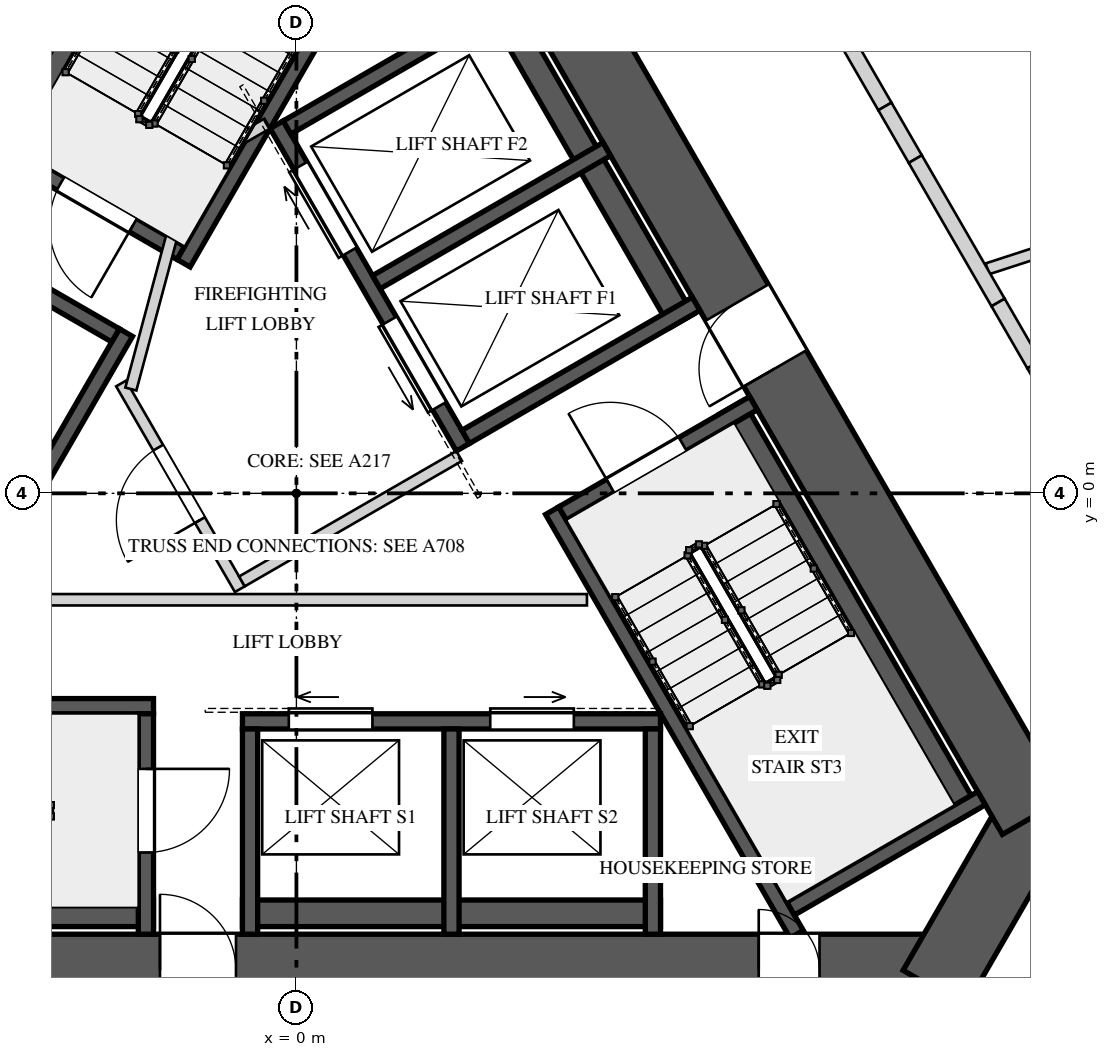
"""IFC4 building model, lengths in metres.
Left out: names, types, materials, properties, quantities, classifications, styles, units other than length and angle.
Written with IfcOpenShell. Run it as: python <this file> out.ifc"""

import sys

from ifc_helpers import new_model, si_unit, direction, frame, frame_2d, origin, place, context, subcontext, project, spatial, rectangle, extrude, element, fill, save


model = new_model("IFC4")
c1 = context("Model", 3, precision=1e-05, world=origin(), true_north=direction((0.0, 1.0)))
c2 = subcontext(c1, "Body", "Model", "MODEL_VIEW")
j1 = project(units=[si_unit("LENGTHUNIT", "METRE"), si_unit("PLANEANGLEUNIT", "RADIAN")], contexts=[c1])
p1 = place(None, origin())
s1 = spatial("IfcSite", under=j1, at=p1, CompositionType="ELEMENT")
p2 = place(p1, origin())
s2 = spatial("IfcBuilding", under=s1, at=p2, CompositionType="ELEMENT")
p3 = place(p2, frame((0.0, 0.0, 120.4)))
s3 = spatial("IfcBuildingStorey", under=s2, at=p3, CompositionType="ELEMENT", Elevation=120.4)
p4 = place(p3, frame((-1.169, 10.525, 0.0), z_axis=(0.0, 0.0, 1.0), x_axis=(-0.499999102847, -0.866025921755, 0.0)))
e1 = element("IfcWall", 1, at=p4, inside=s3, PredefinedType="SHEAR", context=c2, shape_type="SweptSolid", body=[
    extrude(rectangle(XDim=17.061, YDim=0.95, at=frame_2d((8.53, 0.0))), origin(), (0.0, 0.0, 1.0), 5.2),
])
p5 = place(p4, frame((6.735, 0.0, 0.0)))
e2 = element("IfcOpeningElement", 2, at=p5, cuts=e1, PredefinedType="OPENING", context=c2, shape_type="SweptSolid", body=[
    extrude(rectangle(XDim=1.0, YDim=2.4, at=frame_2d((0.5, 1.2))), frame((0.0, 0.485, 0.0), z_axis=(0.0, -1.0, 0.0), x_axis=(1.0, 0.0, 0.0)), (0.0, 0.0, 1.0), 0.97),
])
p6 = place(p3, frame((-8.531, -6.275, 0.0), z_axis=(0.0, 0.0, 1.0), x_axis=(1.0, 0.0, 0.0)))
e3 = element("IfcWall", 3, at=p6, inside=s3, PredefinedType="SHEAR", context=c2, shape_type="SweptSolid", body=[
    extrude(rectangle(XDim=17.061, YDim=0.95, at=frame_2d((8.531, 0.0))), origin(), (0.0, 0.0, 1.0), 5.2),
])
p7 = place(p6, frame((6.735, 0.0, 0.0)))
e4 = element("IfcOpeningElement", 4, at=p7, cuts=e3, PredefinedType="OPENING", context=c2, shape_type="SweptSolid", body=[
    extrude(rectangle(XDim=1.0, YDim=2.4, at=frame_2d((0.5, 1.2))), frame((0.0, 0.485, 0.0), z_axis=(0.0, -1.0, 0.0), x_axis=(1.0, 0.0, 0.0)), (0.0, 0.0, 1.0), 0.97),
])
p8 = place(p6, frame((14.613, 0.0, 0.0)))
e5 = element("IfcOpeningElement", 5, at=p8, cuts=e3, PredefinedType="OPENING", context=c2, shape_type="SweptSolid", body=[
    extrude(rectangle(XDim=0.8, YDim=2.1, at=frame_2d((0.4, 1.05))), frame((0.0, 0.485, 0.0), z_axis=(0.0, -1.0, 0.0), x_axis=(1.0, 0.0, 0.0)), (0.0, 0.0, 1.0), 0.97),
])
p9 = place(p3, frame((8.393, -6.512, 0.0), z_axis=(0.0, 0.0, 1.0), x_axis=(0.499995765644, 0.866027848477, 0.0)))
e6 = element("IfcWall", 6, at=p9, inside=s3, PredefinedType="SHEAR", context=c2, shape_type="SweptSolid", body=[
    extrude(rectangle(XDim=2.887, YDim=0.95, at=frame_2d((1.443, 0.0))), origin(), (0.0, 0.0, 1.0), 5.2),
])
p10 = place(p3, frame((9.699, -4.25, 0.0), z_axis=(0.0, 0.0, 1.0), x_axis=(-0.499999102847, 0.866025921755, 0.0)))
e7 = element("IfcWall", 7, at=p10, inside=s3, PredefinedType="SHEAR", context=c2, shape_type="SweptSolid", body=[
    extrude(rectangle(XDim=17.061, YDim=0.95, at=frame_2d((8.53, 0.0))), origin(), (0.0, 0.0, 1.0), 5.2),
])
p11 = place(p10, frame((6.805, 0.0, 0.0)))
e8 = element("IfcOpeningElement", 8, at=p11, cuts=e7, PredefinedType="OPENING", context=c2, shape_type="SweptSolid", body=[
    extrude(rectangle(XDim=1.0, YDim=2.4, at=frame_2d((0.5, 1.2))), frame((0.0, 0.485, 0.0), z_axis=(0.0, -1.0, 0.0), x_axis=(1.0, 0.0, 0.0)), (0.0, 0.0, 1.0), 0.97),
])
p12 = place(p10, frame((14.114, 0.0, 0.0)))
e9 = element("IfcOpeningElement", 9, at=p12, cuts=e7, PredefinedType="OPENING", context=c2, shape_type="SweptSolid", body=[
    extrude(rectangle(XDim=0.8, YDim=2.1, at=frame_2d((0.4, 1.05))), frame((0.0, 0.485, 0.0), z_axis=(0.0, -1.0, 0.0), x_axis=(1.0, 0.0, 0.0)), (0.0, 0.0, 1.0), 0.97),
])
p13 = place(p3, frame((-0.745, 9.76, 0.0), z_axis=(0.0, 0.0, 1.0), x_axis=(-0.49998037582, -0.866036733513, 0.0)))
e10 = element("IfcWall", 10, at=p13, inside=s3, PredefinedType="SOLIDWALL", context=c2, shape_type="SweptSolid", body=[
    extrude(rectangle(XDim=6.2, YDim=0.35, at=frame_2d((3.1, 0.0))), origin(), (0.0, 0.0, 1.0), 4.85),
])
p14 = place(p3, frame((1.732, 8.6, 0.0), z_axis=(0.0, 0.0, 1.0), x_axis=(-0.499975376872, -0.866039619487, 0.0)))
e11 = element("IfcWall", 11, at=p14, inside=s3, PredefinedType="SOLIDWALL", context=c2, shape_type="SweptSolid", body=[
    extrude(rectangle(XDim=6.434, YDim=0.2, at=frame_2d((3.217, 0.0))), origin(), (0.0, 0.0, 1.0), 4.85),
])
p15 = place(p3, frame((-1.521, 3.165, 0.0), z_axis=(0.0, 0.0, 1.0), x_axis=(-0.866032775405, 0.499987231761, 0.0)))
e12 = element("IfcWall", 12, at=p15, inside=s3, PredefinedType="SOLIDWALL", context=c2, shape_type="SweptSolid", body=[
    extrude(rectangle(XDim=2.9, YDim=0.2, at=frame_2d((1.45, 0.0))), origin(), (0.0, 0.0, 1.0), 4.85),
])
p16 = place(p15, frame((0.725, 0.0, 0.0)))
e13 = element("IfcOpeningElement", 13, at=p16, cuts=e12, PredefinedType="OPENING", context=c2, shape_type="SweptSolid", body=[
    extrude(rectangle(XDim=1.1, YDim=2.4, at=frame_2d((0.55, 1.2))), frame((0.0, 0.11, 0.0), z_axis=(0.0, -1.0, 0.0), x_axis=(1.0, 0.0, 0.0)), (0.0, 0.0, 1.0), 0.22),
])
p17 = place(p3, frame((-8.08, -5.525, 0.0), z_axis=(0.0, 0.0, 1.0), x_axis=(1.0, 0.0, 0.0)))
e14 = element("IfcWall", 14, at=p17, inside=s3, PredefinedType="SOLIDWALL", context=c2, shape_type="SweptSolid", body=[
    extrude(rectangle(XDim=6.2, YDim=0.35, at=frame_2d((3.1, 0.0))), origin(), (0.0, 0.0, 1.0), 4.85),
])
p18 = place(p3, frame((-8.314, -2.8, 0.0), z_axis=(0.0, 0.0, 1.0), x_axis=(1.0, 0.0, 0.0)))
e15 = element("IfcWall", 15, at=p18, inside=s3, PredefinedType="SOLIDWALL", context=c2, shape_type="SweptSolid", body=[
    extrude(rectangle(XDim=6.434, YDim=0.2, at=frame_2d((3.217, 0.0))), origin(), (0.0, 0.0, 1.0), 4.85),
])
p19 = place(p3, frame((-1.98, -2.9, 0.0), z_axis=(0.0, 0.0, 1.0), x_axis=(0.0, -1.0, 0.0)))
e16 = element("IfcWall", 16, at=p19, inside=s3, PredefinedType="SOLIDWALL", context=c2, shape_type="SweptSolid", body=[
    extrude(rectangle(XDim=2.9, YDim=0.2, at=frame_2d((1.45, 0.0))), origin(), (0.0, 0.0, 1.0), 4.85),
])
p20 = place(p19, frame((0.725, 0.0, 0.0)))
e17 = element("IfcOpeningElement", 17, at=p20, cuts=e16, PredefinedType="OPENING", context=c2, shape_type="SweptSolid", body=[
    extrude(rectangle(XDim=1.1, YDim=2.4, at=frame_2d((0.55, 1.2))), frame((0.0, 0.11, 0.0), z_axis=(0.0, -1.0, 0.0), x_axis=(1.0, 0.0, 0.0)), (0.0, 0.0, 1.0), 0.22),
])
p21 = place(p3, frame((8.825, -4.235, 0.0), z_axis=(0.0, 0.0, 1.0), x_axis=(-0.499997426962, 0.866026889324, 0.0)))
e18 = element("IfcWall", 18, at=p21, inside=s3, PredefinedType="SOLIDWALL", context=c2, shape_type="SweptSolid", body=[
    extrude(rectangle(XDim=6.2, YDim=0.35, at=frame_2d((3.1, 0.0))), origin(), (0.0, 0.0, 1.0), 4.85),
])
p22 = place(p3, frame((6.582, -5.8, 0.0), z_axis=(0.0, 0.0, 1.0), x_axis=(-0.499975376872, 0.866039619487, 0.0)))
e19 = element("IfcWall", 19, at=p22, inside=s3, PredefinedType="SOLIDWALL", context=c2, shape_type="SweptSolid", body=[
    extrude(rectangle(XDim=6.434, YDim=0.2, at=frame_2d((3.217, 0.0))), origin(), (0.0, 0.0, 1.0), 4.85),
])
p23 = place(p3, frame((6.501, -5.461, 0.0), z_axis=(0.0, 0.0, 1.0), x_axis=(0.866032775405, 0.499987231761, 0.0)))
e20 = element("IfcWall", 20, at=p23, inside=s3, PredefinedType="SOLIDWALL", context=c2, shape_type="SweptSolid", body=[
    extrude(rectangle(XDim=2.9, YDim=0.2, at=frame_2d((1.45, 0.0))), origin(), (0.0, 0.0, 1.0), 4.85),
])
p24 = place(p3, frame((3.501, -0.265, 0.0), z_axis=(0.0, 0.0, 1.0), x_axis=(0.866032775405, 0.499987231761, 0.0)))
e21 = element("IfcWall", 21, at=p24, inside=s3, PredefinedType="SOLIDWALL", context=c2, shape_type="SweptSolid", body=[
    extrude(rectangle(XDim=2.9, YDim=0.2, at=frame_2d((1.45, 0.0))), origin(), (0.0, 0.0, 1.0), 4.85),
])
p25 = place(p24, frame((0.725, 0.0, 0.0)))
e22 = element("IfcOpeningElement", 22, at=p25, cuts=e21, PredefinedType="OPENING", context=c2, shape_type="SweptSolid", body=[
    extrude(rectangle(XDim=1.1, YDim=2.4, at=frame_2d((0.55, 1.2))), frame((0.0, 0.11, 0.0), z_axis=(0.0, -1.0, 0.0), x_axis=(1.0, 0.0, 0.0)), (0.0, 0.0, 1.0), 0.22),
])
p26 = place(p3, frame((-2.243, 2.115, 0.0), z_axis=(0.0, 0.0, 1.0), x_axis=(-0.499996545922, -0.866027397988, 0.0)))
e23 = element("IfcWall", 23, at=p26, inside=s3, PredefinedType="SOLIDWALL", context=c2, shape_type="SweptSolid", body=[
    extrude(rectangle(XDim=5.5, YDim=0.2, at=frame_2d((2.75, 0.0))), origin(), (0.0, 0.0, 1.0), 4.85),
])
p27 = place(p3, frame((-2.38, 2.078, 0.0), z_axis=(0.0, 0.0, 1.0), x_axis=(-0.866059108428, 0.4999416173, 0.0)))
e24 = element("IfcWall", 24, at=p27, inside=s3, PredefinedType="SOLIDWALL", context=c2, shape_type="SweptSolid", body=[
    extrude(rectangle(XDim=2.7, YDim=0.2, at=frame_2d((1.35, 0.0))), origin(), (0.0, 0.0, 1.0), 4.85),
])
p28 = place(p3, frame((-0.71, -3.0, 0.0), z_axis=(0.0, 0.0, 1.0), x_axis=(1.0, 0.0, 0.0)))
e25 = element("IfcWall", 25, at=p28, inside=s3, PredefinedType="SOLIDWALL", context=c2, shape_type="SweptSolid", body=[
    extrude(rectangle(XDim=5.5, YDim=0.2, at=frame_2d((2.75, 0.0))), origin(), (0.0, 0.0, 1.0), 4.85),
])
p29 = place(p28, frame((0.61, 0.0, 0.0)))
e26 = element("IfcOpeningElement", 26, at=p29, cuts=e25, PredefinedType="OPENING", context=c2, shape_type="SweptSolid", body=[
    extrude(rectangle(XDim=1.1, YDim=2.1, at=frame_2d((0.55, 1.05))), frame((0.0, 0.11, 0.0), z_axis=(0.0, -1.0, 0.0), x_axis=(1.0, 0.0, 0.0)), (0.0, 0.0, 1.0), 0.22),
])
p30 = place(p28, frame((3.26, 0.0, 0.0)))
e27 = element("IfcOpeningElement", 27, at=p30, cuts=e25, PredefinedType="OPENING", context=c2, shape_type="SweptSolid", body=[
    extrude(rectangle(XDim=1.1, YDim=2.1, at=frame_2d((0.55, 1.05))), frame((0.0, 0.11, 0.0), z_axis=(0.0, -1.0, 0.0), x_axis=(1.0, 0.0, 0.0)), (0.0, 0.0, 1.0), 0.22),
])
p31 = place(p3, frame((-0.71, -5.525, 0.0), z_axis=(0.0, 0.0, 1.0), x_axis=(1.0, 0.0, 0.0)))
e28 = element("IfcWall", 28, at=p31, inside=s3, PredefinedType="SOLIDWALL", context=c2, shape_type="SweptSolid", body=[
    extrude(rectangle(XDim=5.5, YDim=0.35, at=frame_2d((2.75, 0.0))), origin(), (0.0, 0.0, 1.0), 4.85),
])
for number, where, z_axis, x_axis in (
    (29, (-0.61, -3.1, 0.0), (0.0, 0.0, 1.0), (0.0, -1.0, 0.0)),
    (30, (2.04, -3.1, 0.0), (0.0, 0.0, 1.0), (0.0, -1.0, 0.0)),
    (31, (4.69, -3.1, 0.0), (0.0, 0.0, 1.0), (0.0, -1.0, 0.0)),
):
    element("IfcWall", number, at=place(p3, frame(where, z_axis=z_axis, x_axis=x_axis)), inside=s3, PredefinedType="SOLIDWALL", context=c2, shape_type="SweptSolid", body=[
        extrude(rectangle(XDim=2.7, YDim=0.2, at=frame_2d((1.35, 0.0))), origin(), (0.0, 0.0, 1.0), 4.85),
    ])
p32 = place(p3, frame((2.19, 0.606, 0.0), z_axis=(0.0, 0.0, 1.0), x_axis=(-0.500002801628, 0.866023786258, 0.0)))
e32 = element("IfcWall", 32, at=p32, inside=s3, PredefinedType="SOLIDWALL", context=c2, shape_type="SweptSolid", body=[
    extrude(rectangle(XDim=4.9, YDim=0.2, at=frame_2d((2.45, 0.0))), origin(), (0.0, 0.0, 1.0), 4.85),
])
p33 = place(p32, frame((0.625, 0.0, 0.0)))
e33 = element("IfcOpeningElement", 33, at=p33, cuts=e32, PredefinedType="OPENING", context=c2, shape_type="SweptSolid", body=[
    extrude(rectangle(XDim=1.3, YDim=2.1, at=frame_2d((0.65, 1.05))), frame((0.0, 0.11, 0.0), z_axis=(0.0, -1.0, 0.0), x_axis=(1.0, 0.0, 0.0)), (0.0, 0.0, 1.0), 0.22),
])
p34 = place(p32, frame((2.975, 0.0, 0.0)))
e34 = element("IfcOpeningElement", 34, at=p34, cuts=e32, PredefinedType="OPENING", context=c2, shape_type="SweptSolid", body=[
    extrude(rectangle(XDim=1.3, YDim=2.1, at=frame_2d((0.65, 1.05))), frame((0.0, 0.11, 0.0), z_axis=(0.0, -1.0, 0.0), x_axis=(1.0, 0.0, 0.0)), (0.0, 0.0, 1.0), 0.22),
])
p35 = place(p3, frame((5.07, 2.269, 0.0), z_axis=(0.0, 0.0, 1.0), x_axis=(-0.49998122708, 0.866036242063, 0.0)))
e35 = element("IfcWall", 35, at=p35, inside=s3, PredefinedType="SOLIDWALL", context=c2, shape_type="SweptSolid", body=[
    extrude(rectangle(XDim=4.9, YDim=0.35, at=frame_2d((2.45, 0.0))), origin(), (0.0, 0.0, 1.0), 4.85),
])
for number, where, z_axis, x_axis in (
    (36, (2.227, 0.743, 0.0), (0.0, 0.0, 1.0), (0.866, 0.5, 0.0)),
    (37, (1.052, 2.778, 0.0), (0.0, 0.0, 1.0), (0.866, 0.5, 0.0)),
):
    element("IfcWall", number, at=place(p3, frame(where, z_axis=z_axis, x_axis=x_axis)), inside=s3, PredefinedType="SOLIDWALL", context=c2, shape_type="SweptSolid", body=[
        extrude(rectangle(XDim=3.5, YDim=0.2, at=frame_2d((1.75, 0.0))), origin(), (0.0, 0.0, 1.0), 4.85),
    ])
p36 = place(p3, frame((-0.123, 4.813, 0.0), z_axis=(0.0, 0.0, 1.0), x_axis=(0.866019471182, 0.500010275428, 0.0)))
e38 = element("IfcWall", 38, at=p36, inside=s3, PredefinedType="SOLIDWALL", context=c2, shape_type="SweptSolid", body=[
    extrude(rectangle(XDim=3.5, YDim=0.2, at=frame_2d((1.75, 0.0))), origin(), (0.0, 0.0, 1.0), 4.85),
])
p37 = place(p3, frame((-0.744, -1.261, 0.0), z_axis=(0.0, 0.0, 1.0), x_axis=(-0.500004234368, 0.866022959057, 0.0)))
e39 = element("IfcWall", 39, at=p37, inside=s3, PredefinedType="PARTITIONING", context=c2, shape_type="SweptSolid", body=[
    extrude(rectangle(XDim=3.125, YDim=0.15, at=frame_2d((1.562, 0.0))), origin(), (0.0, 0.0, 1.0), 4.85),
])
p38 = place(p37, frame((1.05, 0.0, 0.0)))
e40 = element("IfcOpeningElement", 40, at=p38, cuts=e39, PredefinedType="OPENING", context=c2, shape_type="SweptSolid", body=[
    extrude(rectangle(XDim=1.1, YDim=2.4, at=frame_2d((0.55, 1.2))), frame((0.0, 0.085, 0.0), z_axis=(0.0, -1.0, 0.0), x_axis=(1.0, 0.0, 0.0)), (0.0, 0.0, 1.0), 0.17),
])
p39 = place(p3, frame((-0.717, -1.159, 0.0), z_axis=(0.0, 0.0, 1.0), x_axis=(0.866008176907, 0.50002983664, 0.0)))
e41 = element("IfcWall", 41, at=p39, inside=s3, PredefinedType="PARTITIONING", context=c2, shape_type="SweptSolid", body=[
    extrude(rectangle(XDim=3.3, YDim=0.15, at=frame_2d((1.65, 0.0))), origin(), (0.0, 0.0, 1.0), 4.85),
])
p40 = place(p3, frame((-2.178, 1.372, 0.0), z_axis=(0.0, 0.0, 1.0), x_axis=(0.258808958833, 0.96592852884, 0.0)))
e42 = element("IfcWall", 42, at=p40, inside=s3, PredefinedType="PARTITIONING", context=c2, shape_type="SweptSolid", body=[
    extrude(rectangle(XDim=2.903, YDim=0.15, at=frame_2d((1.451, 0.0))), origin(), (0.0, 0.0, 1.0), 4.85),
])
p41 = place(p3, frame((-1.51, 4.215, 0.0), z_axis=(0.0, 0.0, 1.0), x_axis=(0.866085525409, 0.49989585183, 0.0)))
e43 = element("IfcWall", 43, at=p41, inside=s3, PredefinedType="PARTITIONING", context=c2, shape_type="SweptSolid", body=[
    extrude(rectangle(XDim=1.3, YDim=0.15, at=frame_2d((0.65, 0.0))), origin(), (0.0, 0.0, 1.0), 4.85),
])
p42 = place(p3, frame((-4.053, -1.4, 0.0), z_axis=(0.0, 0.0, 1.0), x_axis=(1.0, 0.0, 0.0)))
e44 = element("IfcWall", 44, at=p42, inside=s3, PredefinedType="PARTITIONING", context=c2, shape_type="SweptSolid", body=[
    extrude(rectangle(XDim=7.876, YDim=0.15, at=frame_2d((3.938, 0.0))), origin(), (0.0, 0.0, 1.0), 4.85),
])
p43 = place(p3, frame((9.091, 2.954, 0.0), z_axis=(0.0, 0.0, 1.0), x_axis=(0.951056003265, 0.309018573315, 0.0)))
e45 = element("IfcWall", 45, at=p43, inside=s3, PredefinedType="PARTITIONING", context=c2, shape_type="SweptSolid", body=[
    extrude(rectangle(XDim=8.179, YDim=0.15, at=frame_2d((4.089, 0.0))), origin(), (0.0, 0.0, 1.0), 4.85),
])
p44 = place(p3, frame((6.286, 7.612, 0.0), z_axis=(0.0, 0.0, 1.0), x_axis=(0.499961921997, -0.866047387014, 0.0)))
e46 = element("IfcWall", 46, at=p44, inside=s3, PredefinedType="SOLIDWALL", context=c2, shape_type="SweptSolid", body=[
    extrude(rectangle(XDim=2.912, YDim=0.2, at=frame_2d((1.456, 0.0))), origin(), (0.0, 0.0, 1.0), 4.85),
])
p45 = place(p3, frame((7.742, 5.09, 0.0), z_axis=(0.0, 0.0, 1.0), x_axis=(0.500109828528, -0.865961984968, 0.0)))
e47 = element("IfcWall", 47, at=p45, inside=s3, PredefinedType="SOLIDWALL", context=c2, shape_type="SweptSolid", body=[
    extrude(rectangle(XDim=0.8, YDim=0.2, at=frame_2d((0.4, 0.0))), origin(), (0.0, 0.0, 1.0), 3.95),
])
p46 = place(p3, frame((8.142, 4.397, 0.0), z_axis=(0.0, 0.0, 1.0), x_axis=(0.499948868167, -0.866054922749, 0.0)))
e48 = element("IfcWall", 48, at=p46, inside=s3, PredefinedType="SOLIDWALL", context=c2, shape_type="SweptSolid", body=[
    extrude(rectangle(XDim=2.178, YDim=0.2, at=frame_2d((1.089, 0.0))), origin(), (0.0, 0.0, 1.0), 4.85),
])
p47 = place(p3, frame((9.231, 2.511, 0.0), z_axis=(0.0, 0.0, 1.0), x_axis=(0.500118100521, -0.865957207679, 0.0)))
e49 = element("IfcWall", 49, at=p47, inside=s3, PredefinedType="SOLIDWALL", context=c2, shape_type="SweptSolid", body=[
    extrude(rectangle(XDim=0.944, YDim=0.2, at=frame_2d((0.472, 0.0))), origin(), (0.0, 0.0, 1.0), 3.75),
])
p48 = place(p3, frame((9.703, 1.694, 0.0), z_axis=(0.0, 0.0, 1.0), x_axis=(0.500004272639, -0.866022936961, 0.0)))
e50 = element("IfcWall", 50, at=p48, inside=s3, PredefinedType="SOLIDWALL", context=c2, shape_type="SweptSolid", body=[
    extrude(rectangle(XDim=6.474, YDim=0.2, at=frame_2d((3.237, 0.0))), origin(), (0.0, 0.0, 1.0), 4.85),
])
p49 = place(p48, frame((1.269, 0.0, 0.0)))
e51 = element("IfcOpeningElement", 51, at=p49, cuts=e50, PredefinedType="OPENING", context=c2, shape_type="SweptSolid", body=[
    extrude(rectangle(XDim=1.1, YDim=2.2, at=frame_2d((0.55, 1.1))), frame((0.0, 0.11, 0.0), z_axis=(0.0, -1.0, 0.0), x_axis=(1.0, 0.0, 0.0)), (0.0, 0.0, 1.0), 0.22),
])
p50 = place(p16, origin())
e52 = element("IfcDoor", 52, at=p50, inside=s3, OperationType="SINGLE_SWING_RIGHT", PredefinedType="DOOR", context=c2, shape_type="SweptSolid", body=[
    extrude(rectangle(XDim=1.1, YDim=2.4, at=frame_2d((0.55, 1.2))), frame((0.0, 0.025, 0.0), z_axis=(0.0, -1.0, 0.0), x_axis=(1.0, 0.0, 0.0)), (0.0, 0.0, 1.0), 0.05),
])
fill(e13, e52)
p51 = place(p20, origin())
e53 = element("IfcDoor", 53, at=p51, inside=s3, OperationType="SINGLE_SWING_LEFT", PredefinedType="DOOR", context=c2, shape_type="SweptSolid", body=[
    extrude(rectangle(XDim=1.1, YDim=2.4, at=frame_2d((0.55, 1.2))), frame((0.0, 0.025, 0.0), z_axis=(0.0, -1.0, 0.0), x_axis=(1.0, 0.0, 0.0)), (0.0, 0.0, 1.0), 0.05),
])
fill(e17, e53)
p52 = place(p25, origin())
e54 = element("IfcDoor", 54, at=p52, inside=s3, OperationType="SINGLE_SWING_RIGHT", PredefinedType="DOOR", context=c2, shape_type="SweptSolid", body=[
    extrude(rectangle(XDim=1.1, YDim=2.4, at=frame_2d((0.55, 1.2))), frame((0.0, 0.025, 0.0), z_axis=(0.0, -1.0, 0.0), x_axis=(1.0, 0.0, 0.0)), (0.0, 0.0, 1.0), 0.05),
])
fill(e22, e54)
p53 = place(p29, origin())
e55 = element("IfcDoor", 55, at=p53, inside=s3, OperationType="SLIDING_TO_LEFT", PredefinedType="DOOR", context=c2, shape_type="SweptSolid", body=[
    extrude(rectangle(XDim=1.1, YDim=2.1, at=frame_2d((0.55, 1.05))), frame((0.0, 0.025, 0.0), z_axis=(0.0, -1.0, 0.0), x_axis=(1.0, 0.0, 0.0)), (0.0, 0.0, 1.0), 0.05),
])
fill(e26, e55)
p54 = place(p30, origin())
e56 = element("IfcDoor", 56, at=p54, inside=s3, OperationType="SLIDING_TO_RIGHT", PredefinedType="DOOR", context=c2, shape_type="SweptSolid", body=[
    extrude(rectangle(XDim=1.1, YDim=2.1, at=frame_2d((0.55, 1.05))), frame((0.0, 0.025, 0.0), z_axis=(0.0, -1.0, 0.0), x_axis=(1.0, 0.0, 0.0)), (0.0, 0.0, 1.0), 0.05),
])
fill(e27, e56)
p55 = place(p33, origin())
e57 = element("IfcDoor", 57, at=p55, inside=s3, OperationType="SLIDING_TO_LEFT", PredefinedType="DOOR", context=c2, shape_type="SweptSolid", body=[
    extrude(rectangle(XDim=1.3, YDim=2.1, at=frame_2d((0.65, 1.05))), frame((0.0, 0.025, 0.0), z_axis=(0.0, -1.0, 0.0), x_axis=(1.0, 0.0, 0.0)), (0.0, 0.0, 1.0), 0.05),
])
fill(e33, e57)
p56 = place(p34, origin())
e58 = element("IfcDoor", 58, at=p56, inside=s3, OperationType="SLIDING_TO_RIGHT", PredefinedType="DOOR", context=c2, shape_type="SweptSolid", body=[
    extrude(rectangle(XDim=1.3, YDim=2.1, at=frame_2d((0.65, 1.05))), frame((0.0, 0.025, 0.0), z_axis=(0.0, -1.0, 0.0), x_axis=(1.0, 0.0, 0.0)), (0.0, 0.0, 1.0), 0.05),
])
fill(e34, e58)
p57 = place(p38, origin())
e59 = element("IfcDoor", 59, at=p57, inside=s3, OperationType="SINGLE_SWING_LEFT", PredefinedType="DOOR", context=c2, shape_type="SweptSolid", body=[
    extrude(rectangle(XDim=1.1, YDim=2.4, at=frame_2d((0.55, 1.2))), frame((0.0, 0.025, 0.0), z_axis=(0.0, -1.0, 0.0), x_axis=(1.0, 0.0, 0.0)), (0.0, 0.0, 1.0), 0.05),
])
fill(e40, e59)
p58 = place(p7, origin())
e60 = element("IfcDoor", 60, at=p58, inside=s3, OperationType="SINGLE_SWING_LEFT", PredefinedType="DOOR", context=c2, shape_type="SweptSolid", body=[
    extrude(rectangle(XDim=1.0, YDim=2.4, at=frame_2d((0.5, 1.2))), frame((0.0, 0.025, 0.0), z_axis=(0.0, -1.0, 0.0), x_axis=(1.0, 0.0, 0.0)), (0.0, 0.0, 1.0), 0.05),
])
fill(e4, e60)
p59 = place(p11, origin())
e61 = element("IfcDoor", 61, at=p59, inside=s3, OperationType="SINGLE_SWING_RIGHT", PredefinedType="DOOR", context=c2, shape_type="SweptSolid", body=[
    extrude(rectangle(XDim=1.0, YDim=2.4, at=frame_2d((0.5, 1.2))), frame((0.0, 0.025, 0.0), z_axis=(0.0, -1.0, 0.0), x_axis=(1.0, 0.0, 0.0)), (0.0, 0.0, 1.0), 0.05),
])
fill(e8, e61)
p60 = place(p8, origin())
e62 = element("IfcDoor", 62, at=p60, inside=s3, OperationType="SINGLE_SWING_LEFT", PredefinedType="DOOR", context=c2, shape_type="SweptSolid", body=[
    extrude(rectangle(XDim=0.8, YDim=2.1, at=frame_2d((0.4, 1.05))), frame((0.0, 0.025, 0.0), z_axis=(0.0, -1.0, 0.0), x_axis=(1.0, 0.0, 0.0)), (0.0, 0.0, 1.0), 0.05),
])
fill(e5, e62)
save(model, sys.argv[1])
